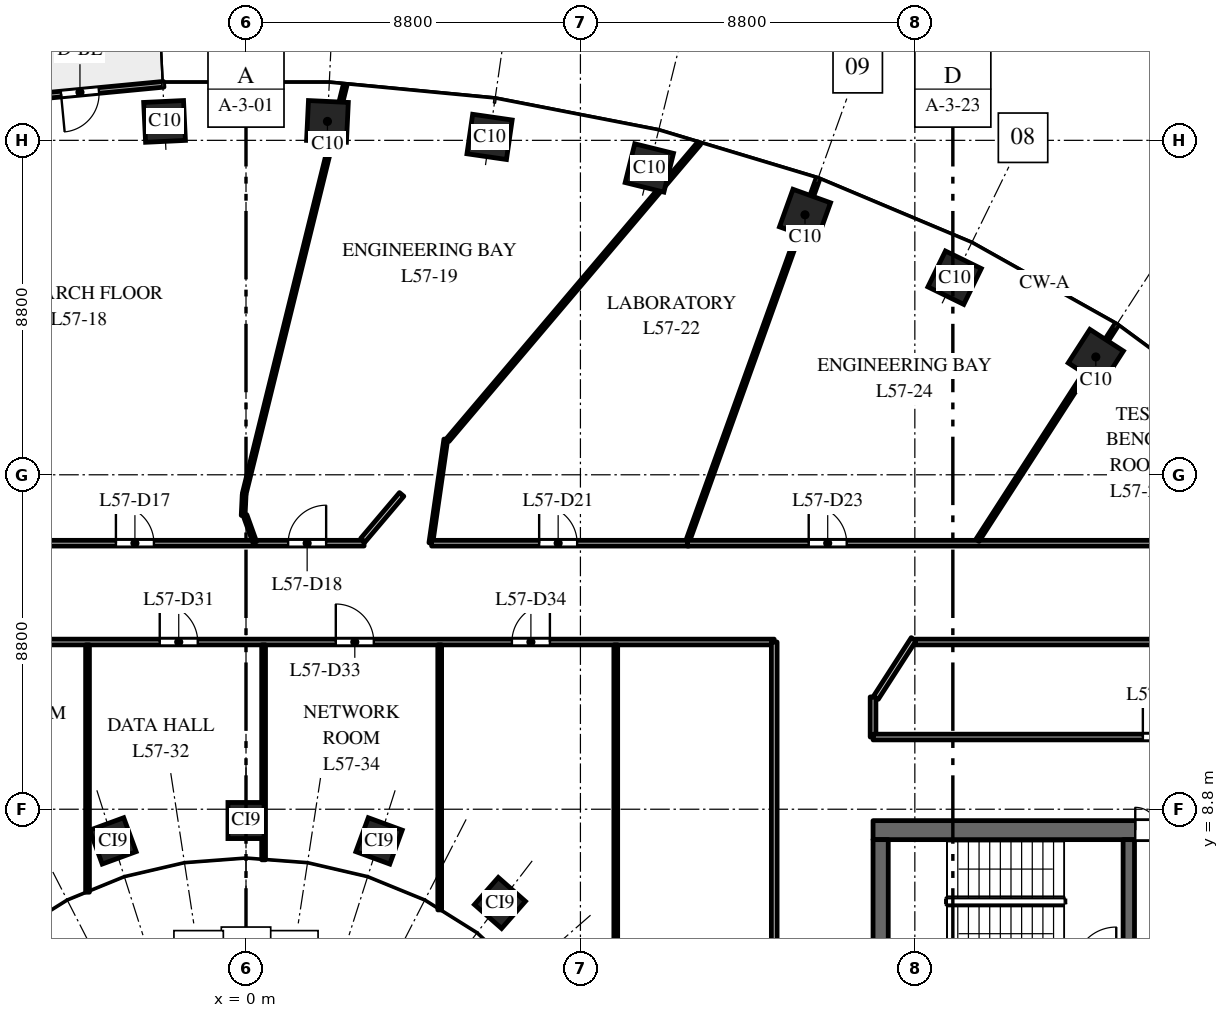
"""IFC4 building model, lengths in metres.
Left out: names, types, materials, properties, quantities, classifications, styles, units other than length and angle.
Written with IfcOpenShell. Run it as: python <this file> out.ifc"""

import sys

from ifc_helpers import new_model, si_unit, direction, frame, frame_2d, origin, origin_2d, place, context, subcontext, project, spatial, rectangle, extrude, element, fill, save


model = new_model("IFC4")
c1 = context("Model", 3, precision=1e-05, world=origin(), true_north=direction((0.0, 1.0)))
c2 = subcontext(c1, "Body", "Model", "MODEL_VIEW")
j1 = project(units=[si_unit("LENGTHUNIT", "METRE"), si_unit("PLANEANGLEUNIT", "RADIAN")], contexts=[c1])
p1 = place(None, origin())
s1 = spatial("IfcSite", under=j1, at=p1, CompositionType="ELEMENT")
p2 = place(p1, origin())
s2 = spatial("IfcBuilding", under=s1, at=p2, CompositionType="ELEMENT")
p3 = place(p2, frame((0.0, 0.0, 269.5)))
s3 = spatial("IfcBuildingStorey", under=s2, at=p3, CompositionType="ELEMENT", Elevation=269.5)
for number, where, z_axis, x_axis in (
    (1, (22.362, 20.7, 0.0), (0.0, 0.0, 1.0), (-0.84, 0.542, 0.0)),
    (2, (18.646, 22.785, 0.0), (0.0, 0.0, 1.0), (-0.898, 0.439, 0.0)),
    (3, (14.709, 24.441, 0.0), (0.0, 0.0, 1.0), (-0.941, 0.338, 0.0)),
    (4, (10.613, 25.674, 0.0), (0.0, 0.0, 1.0), (-0.971, 0.24, 0.0)),
    (5, (6.409, 26.491, 0.0), (0.0, 0.0, 1.0), (-0.99, 0.143, 0.0)),
    (6, (2.143, 26.898, 0.0), (0.0, 0.0, 1.0), (-0.999, 0.048, 0.0)),
    (7, (-2.143, 26.898, 0.0), (0.0, 0.0, 1.0), (-0.999, -0.048, 0.0)),
):
    element("IfcColumn", number, at=place(p3, frame(where, z_axis=z_axis, x_axis=x_axis)), inside=s3, PredefinedType="COLUMN", context=c2, shape_type="SweptSolid", body=[
        extrude(rectangle(XDim=1.05, YDim=1.05, at=origin_2d()), origin(), (0.0, 0.0, 1.0), 4.0),
    ])
for number, where, z_axis, x_axis in (
    (8, (6.682, 6.334, 0.0), (0.0, 0.0, 1.0), (-0.751, 0.66, 0.0)),
    (9, (3.501, 7.967, 0.0), (0.0, 0.0, 1.0), (-0.939, 0.344, 0.0)),
    (10, (0.0, 8.503, 0.0), (0.0, 0.0, 1.0), (-1.0, 0.0, 0.0)),
    (11, (-3.501, 7.967, 0.0), (0.0, 0.0, 1.0), (-0.939, -0.344, 0.0)),
):
    element("IfcColumn", number, at=place(p3, frame(where, z_axis=z_axis, x_axis=x_axis)), inside=s3, PredefinedType="COLUMN", context=c2, shape_type="SweptSolid", body=[
        extrude(rectangle(XDim=0.95, YDim=0.95, at=origin_2d()), origin(), (0.0, 0.0, 1.0), 4.0),
    ])
p4 = place(p3, frame((16.5, 8.25, 0.0), z_axis=(0.0, 0.0, 1.0), x_axis=(1.0, 0.0, 0.0)))
e12 = element("IfcWall", 12, at=p4, inside=s3, PredefinedType="SHEAR", context=c2, shape_type="SweptSolid", body=[
    extrude(rectangle(XDim=15.0, YDim=0.5, at=frame_2d((7.5, 0.0))), origin(), (0.0, 0.0, 1.0), 3.7),
])
p5 = place(p4, frame((6.9, 0.0, 0.0)))
e13 = element("IfcOpeningElement", 13, at=p5, cuts=e12, PredefinedType="OPENING", context=c2, shape_type="SweptSolid", body=[
    extrude(rectangle(XDim=1.2, YDim=2.1, at=frame_2d((0.6, 1.05))), frame((0.0, 0.26, 0.0), z_axis=(0.0, -1.0, 0.0), x_axis=(1.0, 0.0, 0.0)), (0.0, 0.0, 1.0), 0.52),
])
p6 = place(p4, frame((12.05, 0.0, 0.0)))
e14 = element("IfcOpeningElement", 14, at=p6, cuts=e12, PredefinedType="OPENING", context=c2, shape_type="SweptSolid", body=[
    extrude(rectangle(XDim=0.9, YDim=2.1, at=frame_2d((0.45, 1.05))), frame((0.0, 0.26, 0.0), z_axis=(0.0, -1.0, 0.0), x_axis=(1.0, 0.0, 0.0)), (0.0, 0.0, 1.0), 0.52),
])
p7 = place(p3, frame((16.7, -8.0, 0.0), z_axis=(0.0, 0.0, 1.0), x_axis=(0.0, 1.0, 0.0)))
e15 = element("IfcWall", 15, at=p7, inside=s3, PredefinedType="SHEAR", context=c2, shape_type="SweptSolid", body=[
    extrude(rectangle(XDim=16.0, YDim=0.4, at=frame_2d((8.0, 0.0))), origin(), (0.0, 0.0, 1.0), 3.7),
])
p8 = place(p3, frame((23.23, 2.25, 0.0), z_axis=(0.0, 0.0, 1.0), x_axis=(0.0, 1.0, 0.0)))
e16 = element("IfcWall", 16, at=p8, inside=s3, PredefinedType="SHEAR", context=c2, shape_type="SweptSolid", body=[
    extrude(rectangle(XDim=5.75, YDim=0.3, at=frame_2d((2.875, 0.0))), origin(), (0.0, 0.0, 1.0), 3.7),
])
p9 = place(p8, frame((0.6, 0.0, 0.0)))
e17 = element("IfcOpeningElement", 17, at=p9, cuts=e16, PredefinedType="OPENING", context=c2, shape_type="SweptSolid", body=[
    extrude(rectangle(XDim=1.0, YDim=2.1, at=frame_2d((0.5, 1.05))), frame((0.0, 0.16, 0.0), z_axis=(0.0, -1.0, 0.0), x_axis=(1.0, 0.0, 0.0)), (0.0, 0.0, 1.0), 0.32),
])
p10 = place(p3, frame((-2.166, 27.875, 0.0), z_axis=(0.0, 0.0, 1.0), x_axis=(-0.995473879823, -0.095035543824, 0.0)))
e18 = element("IfcWall", 18, at=p10, inside=s3, PredefinedType="STANDARD", context=c2, shape_type="SweptSolid", body=[
    extrude(rectangle(XDim=4.426, YDim=0.15, at=frame_2d((2.213, 0.0))), origin(), (0.0, 0.0, 1.0), 3.7),
])
p11 = place(p10, frame((1.713, 0.0, 0.0)))
e19 = element("IfcOpeningElement", 19, at=p11, cuts=e18, PredefinedType="OPENING", context=c2, shape_type="SweptSolid", body=[
    extrude(rectangle(XDim=1.0, YDim=2.4, at=frame_2d((0.5, 1.2))), frame((0.0, 0.085, 0.0), z_axis=(0.0, -1.0, 0.0), x_axis=(1.0, 0.0, 0.0)), (0.0, 0.0, 1.0), 0.17),
])
p12 = place(p3, frame((-13.9, 13.2, 0.0), z_axis=(0.0, 0.0, 1.0), x_axis=(1.0, 0.0, 0.0)))
e20 = element("IfcWall", 20, at=p12, inside=s3, PredefinedType="PARTITIONING", context=c2, shape_type="SweptSolid", body=[
    extrude(rectangle(XDim=27.8, YDim=0.15, at=frame_2d((13.9, 0.0))), origin(), (0.0, 0.0, 1.0), 2.85),
])
p13 = place(p12, frame((11.63, 0.0, 0.0)))
e21 = element("IfcOpeningElement", 21, at=p13, cuts=e20, PredefinedType="OPENING", context=c2, shape_type="SweptSolid", body=[
    extrude(rectangle(XDim=1.0, YDim=2.1, at=frame_2d((0.5, 1.05))), frame((0.0, 0.085, 0.0), z_axis=(0.0, -1.0, 0.0), x_axis=(1.0, 0.0, 0.0)), (0.0, 0.0, 1.0), 0.17),
])
p14 = place(p12, frame((16.263, 0.0, 0.0)))
e22 = element("IfcOpeningElement", 22, at=p14, cuts=e20, PredefinedType="OPENING", context=c2, shape_type="SweptSolid", body=[
    extrude(rectangle(XDim=1.0, YDim=2.1, at=frame_2d((0.5, 1.05))), frame((0.0, 0.085, 0.0), z_axis=(0.0, -1.0, 0.0), x_axis=(1.0, 0.0, 0.0)), (0.0, 0.0, 1.0), 0.17),
])
p15 = place(p12, frame((20.897, 0.0, 0.0)))
e23 = element("IfcOpeningElement", 23, at=p15, cuts=e20, PredefinedType="OPENING", context=c2, shape_type="SweptSolid", body=[
    extrude(rectangle(XDim=1.0, YDim=2.1, at=frame_2d((0.5, 1.05))), frame((0.0, 0.085, 0.0), z_axis=(0.0, -1.0, 0.0), x_axis=(1.0, 0.0, 0.0)), (0.0, 0.0, 1.0), 0.17),
])
p16 = place(p3, frame((-6.152, 15.8, 0.0), z_axis=(0.0, 0.0, 1.0), x_axis=(1.0, 0.0, 0.0)))
e24 = element("IfcWall", 24, at=p16, inside=s3, PredefinedType="PARTITIONING", context=c2, shape_type="SweptSolid", body=[
    extrude(rectangle(XDim=9.259, YDim=0.15, at=frame_2d((4.629, 0.0))), origin(), (0.0, 0.0, 1.0), 2.85),
])
p17 = place(p16, frame((2.729, 0.0, 0.0)))
e25 = element("IfcOpeningElement", 25, at=p17, cuts=e24, PredefinedType="OPENING", context=c2, shape_type="SweptSolid", body=[
    extrude(rectangle(XDim=1.0, YDim=2.1, at=frame_2d((0.5, 1.05))), frame((0.0, 0.085, 0.0), z_axis=(0.0, -1.0, 0.0), x_axis=(1.0, 0.0, 0.0)), (0.0, 0.0, 1.0), 0.17),
])
p18 = place(p16, frame((7.261, 0.0, 0.0)))
e26 = element("IfcOpeningElement", 26, at=p18, cuts=e24, PredefinedType="OPENING", context=c2, shape_type="SweptSolid", body=[
    extrude(rectangle(XDim=1.0, YDim=2.1, at=frame_2d((0.5, 1.05))), frame((0.0, 0.085, 0.0), z_axis=(0.0, -1.0, 0.0), x_axis=(1.0, 0.0, 0.0)), (0.0, 0.0, 1.0), 0.17),
])
p19 = place(p3, frame((-4.17, 6.617, 0.0), z_axis=(0.0, 0.0, 1.0), x_axis=(0.0, 1.0, 0.0)))
e27 = element("IfcWall", 27, at=p19, inside=s3, PredefinedType="PARTITIONING", context=c2, shape_type="SweptSolid", body=[
    extrude(rectangle(XDim=6.508, YDim=0.1, at=frame_2d((3.254, 0.0))), origin(), (0.0, 0.0, 1.0), 2.85),
])
p20 = place(p3, frame((-0.075, 16.528, 0.0), z_axis=(0.0, 0.0, 1.0), x_axis=(0.047184463658, 0.998886192912, 0.0)))
e28 = element("IfcWall", 28, at=p20, inside=s3, PredefinedType="PARTITIONING", context=c2, shape_type="SweptSolid", body=[
    extrude(rectangle(XDim=0.549, YDim=0.1, at=frame_2d((0.274, 0.0))), origin(), (0.0, 0.0, 1.0), 3.7),
])
p21 = place(p3, frame((-0.025, 16.535, 0.0), z_axis=(0.0, 0.0, 1.0), x_axis=(0.338627931753, -0.940920359986, 0.0)))
e29 = element("IfcWall", 29, at=p21, inside=s3, PredefinedType="PARTITIONING", context=c2, shape_type="SweptSolid", body=[
    extrude(rectangle(XDim=0.756, YDim=0.1, at=frame_2d((0.378, 0.0))), origin(), (0.0, 0.0, 1.0), 3.7),
])
p22 = place(p3, frame((-0.048, 17.097, 0.0), z_axis=(0.0, 0.0, 1.0), x_axis=(0.23971007337, 0.970844519336, 0.0)))
e30 = element("IfcWall", 30, at=p22, inside=s3, PredefinedType="PARTITIONING", context=c2, shape_type="SweptSolid", body=[
    extrude(rectangle(XDim=11.084, YDim=0.1, at=frame_2d((5.542, 0.0))), origin(), (0.0, 0.0, 1.0), 3.0),
])
p23 = place(p3, frame((0.463, 7.469, 0.0), z_axis=(0.0, 0.0, 1.0), x_axis=(0.0, 1.0, 0.0)))
e31 = element("IfcWall", 31, at=p23, inside=s3, PredefinedType="PARTITIONING", context=c2, shape_type="SweptSolid", body=[
    extrude(rectangle(XDim=5.656, YDim=0.1, at=frame_2d((2.828, 0.0))), origin(), (0.0, 0.0, 1.0), 3.0),
])
p24 = place(p3, frame((3.075, 15.878, 0.0), z_axis=(0.0, 0.0, 1.0), x_axis=(0.646427152644, 0.76297571149, 0.0)))
e32 = element("IfcWall", 32, at=p24, inside=s3, PredefinedType="PARTITIONING", context=c2, shape_type="SweptSolid", body=[
    extrude(rectangle(XDim=1.579, YDim=0.15, at=frame_2d((0.79, 0.0))), origin(), (0.0, 0.0, 1.0), 2.85),
])
p25 = place(p3, frame((4.864, 15.804, 0.0), z_axis=(0.0, 0.0, 1.0), x_axis=(0.142908722314, 0.989735872385, 0.0)))
e33 = element("IfcWall", 33, at=p25, inside=s3, PredefinedType="PARTITIONING", context=c2, shape_type="SweptSolid", body=[
    extrude(rectangle(XDim=2.757, YDim=0.1, at=frame_2d((1.379, 0.0))), origin(), (0.0, 0.0, 1.0), 3.7),
])
p26 = place(p3, frame((4.884, 15.8, 0.0), z_axis=(0.0, 0.0, 1.0), x_axis=(1.0, 0.0, 0.0)))
e34 = element("IfcWall", 34, at=p26, inside=s3, PredefinedType="PARTITIONING", context=c2, shape_type="SweptSolid", body=[
    extrude(rectangle(XDim=6.771, YDim=0.15, at=frame_2d((3.385, 0.0))), origin(), (0.0, 0.0, 1.0), 2.85),
])
p27 = place(p26, frame((2.83, 0.0, 0.0)))
e35 = element("IfcOpeningElement", 35, at=p27, cuts=e34, PredefinedType="OPENING", context=c2, shape_type="SweptSolid", body=[
    extrude(rectangle(XDim=1.0, YDim=2.1, at=frame_2d((0.5, 1.05))), frame((0.0, 0.085, 0.0), z_axis=(0.0, -1.0, 0.0), x_axis=(1.0, 0.0, 0.0)), (0.0, 0.0, 1.0), 0.17),
])
p28 = place(p3, frame((5.097, 6.151, 0.0), z_axis=(0.0, 0.0, 1.0), x_axis=(0.0, 1.0, 0.0)))
e36 = element("IfcWall", 36, at=p28, inside=s3, PredefinedType="PARTITIONING", context=c2, shape_type="SweptSolid", body=[
    extrude(rectangle(XDim=6.974, YDim=0.1, at=frame_2d((3.487, 0.0))), origin(), (0.0, 0.0, 1.0), 2.85),
])
p29 = place(p3, frame((5.306, 18.512, 0.0), z_axis=(0.0, 0.0, 1.0), x_axis=(0.646500054355, 0.762913939917, 0.0)))
e37 = element("IfcWall", 37, at=p29, inside=s3, PredefinedType="PARTITIONING", context=c2, shape_type="SweptSolid", body=[
    extrude(rectangle(XDim=10.239, YDim=0.1, at=frame_2d((5.119, 0.0))), origin(), (0.0, 0.0, 1.0), 3.0),
])
p30 = place(p3, frame((9.73, -13.125, 0.0), z_axis=(0.0, 0.0, 1.0), x_axis=(0.0, 1.0, 0.0)))
e38 = element("IfcWall", 38, at=p30, inside=s3, PredefinedType="PARTITIONING", context=c2, shape_type="SweptSolid", body=[
    extrude(rectangle(XDim=26.25, YDim=0.1, at=frame_2d((13.125, 0.0))), origin(), (0.0, 0.0, 1.0), 2.75),
])
p31 = place(p3, frame((11.629, 15.875, 0.0), z_axis=(0.0, 0.0, 1.0), x_axis=(0.338394316696, 0.94100440298, 0.0)))
e39 = element("IfcWall", 39, at=p31, inside=s3, PredefinedType="PARTITIONING", context=c2, shape_type="SweptSolid", body=[
    extrude(rectangle(XDim=10.104, YDim=0.1, at=frame_2d((5.052, 0.0))), origin(), (0.0, 0.0, 1.0), 2.85),
])
p32 = place(p3, frame((11.614, 15.8, 0.0), z_axis=(0.0, 0.0, 1.0), x_axis=(1.0, 0.0, 0.0)))
e40 = element("IfcWall", 40, at=p32, inside=s3, PredefinedType="PARTITIONING", context=c2, shape_type="SweptSolid", body=[
    extrude(rectangle(XDim=16.386, YDim=0.15, at=frame_2d((8.193, 0.0))), origin(), (0.0, 0.0, 1.0), 3.0),
])
p33 = place(p32, frame((3.193, 0.0, 0.0)))
e41 = element("IfcOpeningElement", 41, at=p33, cuts=e40, PredefinedType="OPENING", context=c2, shape_type="SweptSolid", body=[
    extrude(rectangle(XDim=1.0, YDim=2.1, at=frame_2d((0.5, 1.05))), frame((0.0, 0.085, 0.0), z_axis=(0.0, -1.0, 0.0), x_axis=(1.0, 0.0, 0.0)), (0.0, 0.0, 1.0), 0.17),
])
p34 = place(p3, frame((13.9, -13.2, 0.0), z_axis=(0.0, 0.0, 1.0), x_axis=(0.0, 1.0, 0.0)))
e42 = element("IfcWall", 42, at=p34, inside=s3, PredefinedType="PARTITIONING", context=c2, shape_type="SweptSolid", body=[
    extrude(rectangle(XDim=26.4, YDim=0.15, at=frame_2d((13.2, 0.0))), origin(), (0.0, 0.0, 1.0), 2.75),
])
p35 = place(p34, frame((12.75, 0.0, 0.0)))
e43 = element("IfcOpeningElement", 43, at=p35, cuts=e42, PredefinedType="OPENING", context=c2, shape_type="SweptSolid", body=[
    extrude(rectangle(XDim=1.0, YDim=2.1, at=frame_2d((0.5, 1.05))), frame((0.0, 0.085, 0.0), z_axis=(0.0, -1.0, 0.0), x_axis=(1.0, 0.0, 0.0)), (0.0, 0.0, 1.0), 0.17),
])
p36 = place(p3, frame((16.5, 10.7, 0.0), z_axis=(0.0, 0.0, 1.0), x_axis=(0.0, 1.0, 0.0)))
e44 = element("IfcWall", 44, at=p36, inside=s3, PredefinedType="PARTITIONING", context=c2, shape_type="SweptSolid", body=[
    extrude(rectangle(XDim=1.055, YDim=0.15, at=frame_2d((0.527, 0.0))), origin(), (0.0, 0.0, 1.0), 3.7),
])
p37 = place(p3, frame((16.5, 10.7, 0.0), z_axis=(0.0, 0.0, 1.0), x_axis=(1.0, 0.0, 0.0)))
e45 = element("IfcWall", 45, at=p37, inside=s3, PredefinedType="PARTITIONING", context=c2, shape_type="SweptSolid", body=[
    extrude(rectangle(XDim=15.0, YDim=0.15, at=frame_2d((7.5, 0.0))), origin(), (0.0, 0.0, 1.0), 2.75),
])
p38 = place(p37, frame((7.1, 0.0, 0.0)))
e46 = element("IfcOpeningElement", 46, at=p38, cuts=e45, PredefinedType="OPENING", context=c2, shape_type="SweptSolid", body=[
    extrude(rectangle(XDim=1.0, YDim=2.1, at=frame_2d((0.5, 1.05))), frame((0.0, 0.085, 0.0), z_axis=(0.0, -1.0, 0.0), x_axis=(1.0, 0.0, 0.0)), (0.0, 0.0, 1.0), 0.17),
])
p39 = place(p3, frame((16.575, 11.733, 0.0), z_axis=(0.0, 0.0, 1.0), x_axis=(0.541860116324, 0.840468687304, 0.0)))
e47 = element("IfcWall", 47, at=p39, inside=s3, PredefinedType="PARTITIONING", context=c2, shape_type="SweptSolid", body=[
    extrude(rectangle(XDim=1.835, YDim=0.15, at=frame_2d((0.917, 0.0))), origin(), (0.0, 0.0, 1.0), 3.7),
])
p40 = place(p3, frame((17.61, 13.2, 0.0), z_axis=(0.0, 0.0, 1.0), x_axis=(1.0, 0.0, 0.0)))
e48 = element("IfcWall", 48, at=p40, inside=s3, PredefinedType="PARTITIONING", context=c2, shape_type="SweptSolid", body=[
    extrude(rectangle(XDim=10.39, YDim=0.15, at=frame_2d((5.195, 0.0))), origin(), (0.0, 0.0, 1.0), 2.75),
])
p41 = place(p3, frame((19.248, 15.875, 0.0), z_axis=(0.0, 0.0, 1.0), x_axis=(0.542216737844, 0.840238662049, 0.0)))
e49 = element("IfcWall", 49, at=p41, inside=s3, PredefinedType="PARTITIONING", context=c2, shape_type="SweptSolid", body=[
    extrude(rectangle(XDim=6.744, YDim=0.1, at=frame_2d((3.372, 0.0))), origin(), (0.0, 0.0, 1.0), 3.7),
])
p42 = place(p5, origin())
e50 = element("IfcDoor", 50, at=p42, inside=s3, OperationType="DOUBLE_DOOR_DOUBLE_SWING", PredefinedType="DOOR", context=c2, shape_type="SweptSolid", body=[
    extrude(rectangle(XDim=1.2, YDim=2.1, at=frame_2d((0.6, 1.05))), frame((0.0, 0.025, 0.0), z_axis=(0.0, -1.0, 0.0), x_axis=(1.0, 0.0, 0.0)), (0.0, 0.0, 1.0), 0.05),
])
fill(e13, e50)
p43 = place(p11, origin())
e51 = element("IfcDoor", 51, at=p43, inside=s3, OperationType="SINGLE_SWING_RIGHT", PredefinedType="DOOR", context=c2, shape_type="SweptSolid", body=[
    extrude(rectangle(XDim=1.0, YDim=2.4, at=frame_2d((0.5, 1.2))), frame((0.0, 0.025, 0.0), z_axis=(0.0, -1.0, 0.0), x_axis=(1.0, 0.0, 0.0)), (0.0, 0.0, 1.0), 0.05),
])
fill(e19, e51)
p44 = place(p17, origin())
e52 = element("IfcDoor", 52, at=p44, inside=s3, OperationType="SINGLE_SWING_LEFT", PredefinedType="DOOR", context=c2, shape_type="SweptSolid", body=[
    extrude(rectangle(XDim=1.0, YDim=2.1, at=frame_2d((0.5, 1.05))), frame((0.0, 0.025, 0.0), z_axis=(0.0, -1.0, 0.0), x_axis=(1.0, 0.0, 0.0)), (0.0, 0.0, 1.0), 0.05),
])
fill(e25, e52)
p45 = place(p18, origin())
e53 = element("IfcDoor", 53, at=p45, inside=s3, OperationType="SINGLE_SWING_RIGHT", PredefinedType="DOOR", context=c2, shape_type="SweptSolid", body=[
    extrude(rectangle(XDim=1.0, YDim=2.1, at=frame_2d((0.5, 1.05))), frame((0.0, 0.025, 0.0), z_axis=(0.0, -1.0, 0.0), x_axis=(1.0, 0.0, 0.0)), (0.0, 0.0, 1.0), 0.05),
])
fill(e26, e53)
p46 = place(p27, origin())
e54 = element("IfcDoor", 54, at=p46, inside=s3, OperationType="SINGLE_SWING_LEFT", PredefinedType="DOOR", context=c2, shape_type="SweptSolid", body=[
    extrude(rectangle(XDim=1.0, YDim=2.1, at=frame_2d((0.5, 1.05))), frame((0.0, 0.025, 0.0), z_axis=(0.0, -1.0, 0.0), x_axis=(1.0, 0.0, 0.0)), (0.0, 0.0, 1.0), 0.05),
])
fill(e35, e54)
p47 = place(p33, origin())
e55 = element("IfcDoor", 55, at=p47, inside=s3, OperationType="SINGLE_SWING_LEFT", PredefinedType="DOOR", context=c2, shape_type="SweptSolid", body=[
    extrude(rectangle(XDim=1.0, YDim=2.1, at=frame_2d((0.5, 1.05))), frame((0.0, 0.025, 0.0), z_axis=(0.0, -1.0, 0.0), x_axis=(1.0, 0.0, 0.0)), (0.0, 0.0, 1.0), 0.05),
])
fill(e41, e55)
p48 = place(p38, origin())
e56 = element("IfcDoor", 56, at=p48, inside=s3, OperationType="SINGLE_SWING_LEFT", PredefinedType="DOOR", context=c2, shape_type="SweptSolid", body=[
    extrude(rectangle(XDim=1.0, YDim=2.1, at=frame_2d((0.5, 1.05))), frame((0.0, 0.025, 0.0), z_axis=(0.0, -1.0, 0.0), x_axis=(1.0, 0.0, 0.0)), (0.0, 0.0, 1.0), 0.05),
])
fill(e46, e56)
p49 = place(p13, origin())
e57 = element("IfcDoor", 57, at=p49, inside=s3, OperationType="SINGLE_SWING_LEFT", PredefinedType="DOOR", context=c2, shape_type="SweptSolid", body=[
    extrude(rectangle(XDim=1.0, YDim=2.1, at=frame_2d((0.5, 1.05))), frame((0.0, 0.025, 0.0), z_axis=(0.0, -1.0, 0.0), x_axis=(1.0, 0.0, 0.0)), (0.0, 0.0, 1.0), 0.05),
])
fill(e21, e57)
p50 = place(p14, origin())
e58 = element("IfcDoor", 58, at=p50, inside=s3, OperationType="SINGLE_SWING_LEFT", PredefinedType="DOOR", context=c2, shape_type="SweptSolid", body=[
    extrude(rectangle(XDim=1.0, YDim=2.1, at=frame_2d((0.5, 1.05))), frame((0.0, 0.025, 0.0), z_axis=(0.0, -1.0, 0.0), x_axis=(1.0, 0.0, 0.0)), (0.0, 0.0, 1.0), 0.05),
])
fill(e22, e58)
p51 = place(p15, origin())
e59 = element("IfcDoor", 59, at=p51, inside=s3, OperationType="SINGLE_SWING_RIGHT", PredefinedType="DOOR", context=c2, shape_type="SweptSolid", body=[
    extrude(rectangle(XDim=1.0, YDim=2.1, at=frame_2d((0.5, 1.05))), frame((0.0, 0.025, 0.0), z_axis=(0.0, -1.0, 0.0), x_axis=(1.0, 0.0, 0.0)), (0.0, 0.0, 1.0), 0.05),
])
fill(e23, e59)
save(model, sys.argv[1])
